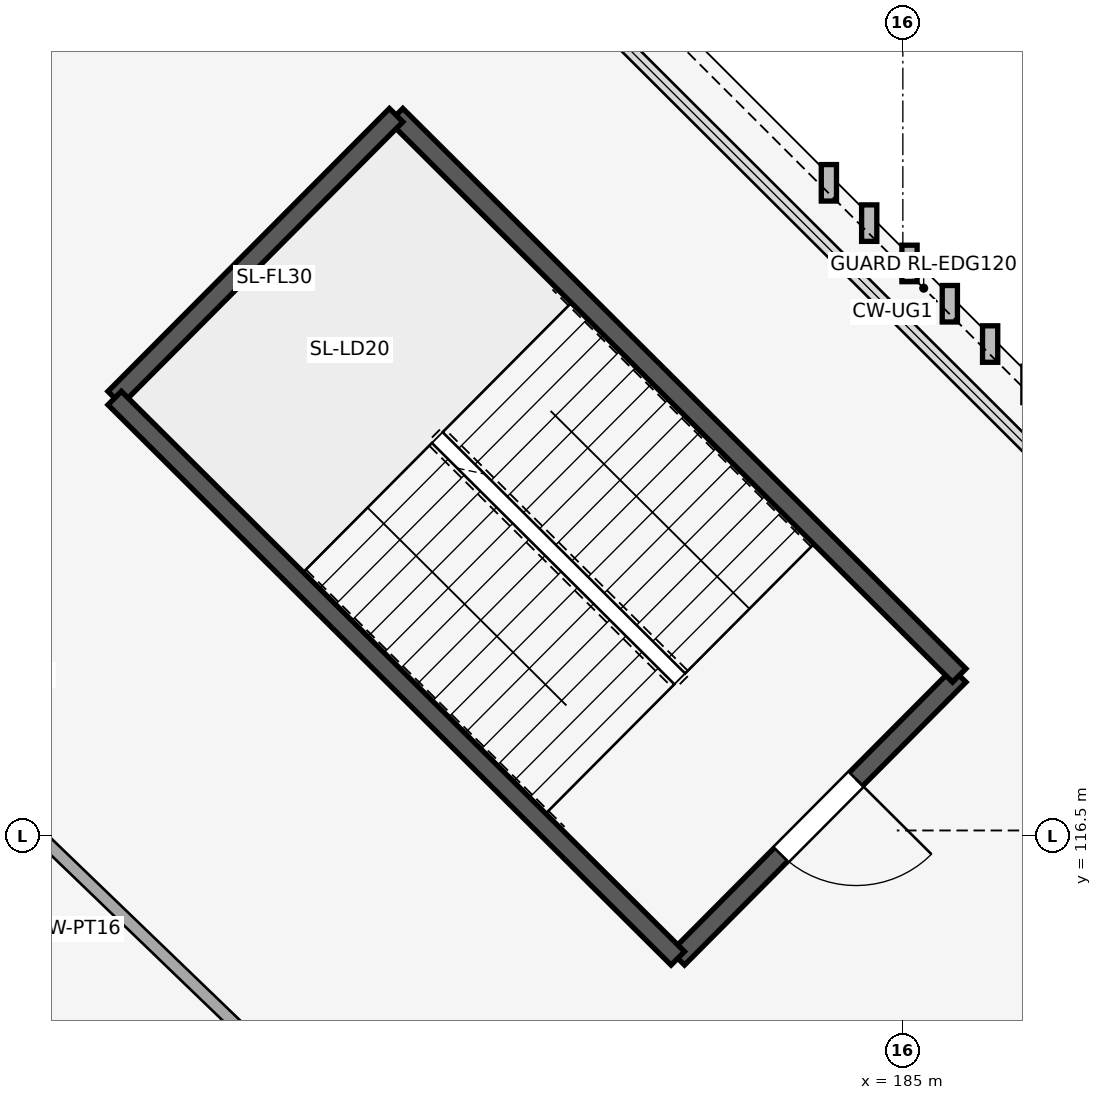
"""IFC4 building model, lengths in metres.
Left out: names, types, materials, properties, quantities, classifications, styles, units other than length and angle.
Written with IfcOpenShell. Run it as: python <this file> out.ifc"""

import sys

from ifc_helpers import new_model, si_unit, direction, frame, frame_2d, origin, place, context, subcontext, project, spatial, rectangle, extrude, element, fill, save


model = new_model("IFC4")
c1 = context("Model", 3, precision=1e-05, world=origin(), true_north=direction((0.0, 1.0)))
c2 = subcontext(c1, "Body", "Model", "MODEL_VIEW")
j1 = project(units=[si_unit("LENGTHUNIT", "METRE"), si_unit("PLANEANGLEUNIT", "RADIAN")], contexts=[c1])
p1 = place(None, origin())
s1 = spatial("IfcSite", under=j1, at=p1, CompositionType="ELEMENT")
p2 = place(p1, origin())
s2 = spatial("IfcBuilding", under=s1, at=p2, CompositionType="ELEMENT")
p3 = place(p2, frame((0.0, 0.0, 5.4)))
s3 = spatial("IfcBuildingStorey", under=s2, at=p3, CompositionType="ELEMENT", Elevation=5.4)
p4 = place(p3, frame((182.039, 114.898, 0.0), z_axis=(0.0, 0.0, 1.0), x_axis=(0.705314141126, 0.708894888067, 0.0)))
e1 = element("IfcWall", 1, at=p4, inside=s3, PredefinedType="SHEAR", context=c2, shape_type="SweptSolid", body=[
    extrude(rectangle(XDim=5.25, YDim=0.25, at=frame_2d((2.625, 0.0))), origin(), (0.0, 0.0, 1.0), 4.92),
])
p5 = place(p4, frame((1.925, 0.0, 0.0)))
e2 = element("IfcOpeningElement", 2, at=p5, cuts=e1, PredefinedType="OPENING", context=c2, shape_type="SweptSolid", body=[
    extrude(rectangle(XDim=1.4, YDim=2.2, at=frame_2d((0.7, 1.1))), frame((0.0, 0.135, 0.0), z_axis=(0.0, -1.0, 0.0), x_axis=(1.0, 0.0, 0.0)), (0.0, 0.0, 1.0), 0.27),
])
p6 = place(p3, frame((185.742, 118.62, 0.0), z_axis=(0.0, 0.0, 1.0), x_axis=(-0.708891762409, 0.705317282639, 0.0)))
e3 = element("IfcWall", 3, at=p6, inside=s3, PredefinedType="SHEAR", context=c2, shape_type="SweptSolid", body=[
    extrude(rectangle(XDim=10.45, YDim=0.25, at=frame_2d((5.225, 0.0))), origin(), (0.0, 0.0, 1.0), 4.92),
])
p7 = place(p3, frame((178.334, 125.99, 0.0), z_axis=(0.0, 0.0, 1.0), x_axis=(-0.705314141126, -0.708894888067, 0.0)))
e4 = element("IfcWall", 4, at=p7, inside=s3, PredefinedType="SHEAR", context=c2, shape_type="SweptSolid", body=[
    extrude(rectangle(XDim=5.25, YDim=0.25, at=frame_2d((2.625, 0.0))), origin(), (0.0, 0.0, 1.0), 4.92),
])
p8 = place(p3, frame((174.631, 122.269, 0.0), z_axis=(0.0, 0.0, 1.0), x_axis=(0.708891762409, -0.705317282639, 0.0)))
e5 = element("IfcWall", 5, at=p8, inside=s3, PredefinedType="SHEAR", context=c2, shape_type="SweptSolid", body=[
    extrude(rectangle(XDim=10.45, YDim=0.25, at=frame_2d((5.225, 0.0))), origin(), (0.0, 0.0, 1.0), 4.92),
])
p9 = place(p3, frame((178.732, 111.609, 0.0), z_axis=(0.0, 0.0, 1.0), x_axis=(-0.720180032826, 0.693787229862, 0.0)))
e6 = element("IfcWall", 6, at=p9, inside=s3, PredefinedType="PARTITIONING", context=c2, shape_type="SweptSolid", body=[
    extrude(rectangle(XDim=16.632, YDim=0.16, at=frame_2d((8.316, 0.0))), origin(), (0.0, 0.0, 1.0), 3.67),
])
p10 = place(p9, frame((7.866, 0.0, 0.0)))
e7 = element("IfcOpeningElement", 7, at=p10, cuts=e6, PredefinedType="OPENING", context=c2, shape_type="SweptSolid", body=[
    extrude(rectangle(XDim=0.9, YDim=2.38, at=frame_2d((0.45, 1.19))), frame((0.0, 0.09, 0.0), z_axis=(0.0, -1.0, 0.0), x_axis=(1.0, 0.0, 0.0)), (0.0, 0.0, 1.0), 0.18),
])
p11 = place(p5, frame((1.4, 0.0, 0.0), z_axis=(0.0, 0.0, 1.0), x_axis=(-1.0, 0.0, 0.0)))
e8 = element("IfcDoor", 8, at=p11, inside=s3, OperationType="SINGLE_SWING_LEFT", PredefinedType="DOOR", context=c2, shape_type="SweptSolid", body=[
    extrude(rectangle(XDim=1.4, YDim=2.2, at=frame_2d((0.7, 1.1))), frame((0.0, 0.025, 0.0), z_axis=(0.0, -1.0, 0.0), x_axis=(1.0, 0.0, 0.0)), (0.0, 0.0, 1.0), 0.05),
])
fill(e2, e8)
save(model, sys.argv[1])
